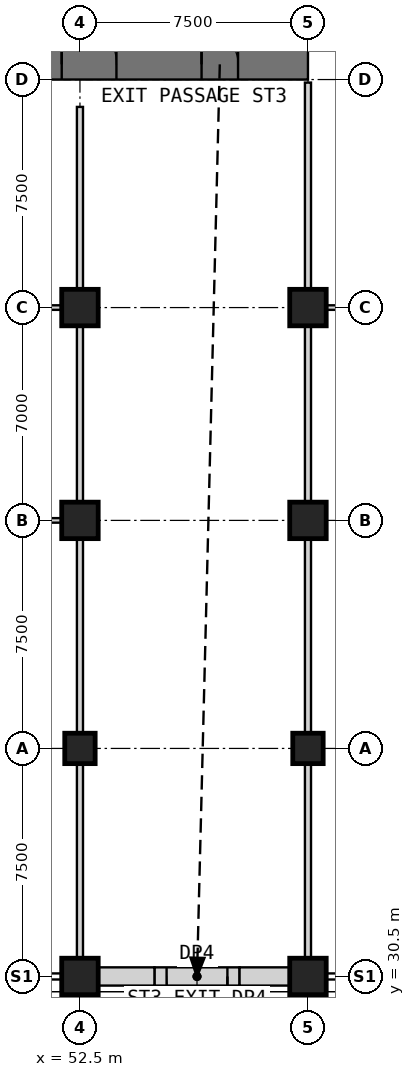
"""IFC4 building model, lengths in metres.
Left out: names, types, materials, properties, quantities, classifications, styles, units other than length and angle.
Written with IfcOpenShell. Run it as: python <this file> out.ifc"""

import sys

from ifc_helpers import new_model, si_unit, direction, frame, frame_2d, origin, origin_2d, place, context, subcontext, project, spatial, rectangle, extrude, element, fill, save


model = new_model("IFC4")
c1 = context("Model", 3, precision=1e-05, world=origin(), true_north=direction((0.0, 1.0)))
c2 = subcontext(c1, "Body", "Model", "MODEL_VIEW")
j1 = project(units=[si_unit("LENGTHUNIT", "METRE"), si_unit("PLANEANGLEUNIT", "RADIAN")], contexts=[c1])
p1 = place(None, origin())
s1 = spatial("IfcSite", under=j1, at=p1, CompositionType="ELEMENT")
p2 = place(p1, origin())
s2 = spatial("IfcBuilding", under=s1, at=p2, CompositionType="ELEMENT")
p3 = place(p2, origin())
s3 = spatial("IfcBuildingStorey", under=s2, at=p3, CompositionType="ELEMENT", Elevation=0.0)
p4 = place(p3, frame((52.5, 38.0, 0.0), z_axis=(0.0, 0.0, 1.0), x_axis=(1.0, 0.0, 0.0)))
e1 = element("IfcColumn", 1, at=p4, inside=s3, PredefinedType="COLUMN", context=c2, shape_type="SweptSolid", body=[
    extrude(rectangle(XDim=1.0, YDim=1.0, at=origin_2d()), origin(), (0.0, 0.0, 1.0), 8.0),
])
for number, where, z_axis, x_axis in (
    (2, (52.5, 45.5, 0.0), (0.0, 0.0, 1.0), (1.0, 0.0, 0.0)),
    (3, (52.5, 52.5, 0.0), (0.0, 0.0, 1.0), (1.0, 0.0, 0.0)),
):
    element("IfcColumn", number, at=place(p3, frame(where, z_axis=z_axis, x_axis=x_axis)), inside=s3, PredefinedType="COLUMN", context=c2, shape_type="SweptSolid", body=[
        extrude(rectangle(XDim=1.2, YDim=1.2, at=origin_2d()), origin(), (0.0, 0.0, 1.0), 8.0),
    ])
p5 = place(p3, frame((60.0, 38.0, 0.0), z_axis=(0.0, 0.0, 1.0), x_axis=(1.0, 0.0, 0.0)))
e4 = element("IfcColumn", 4, at=p5, inside=s3, PredefinedType="COLUMN", context=c2, shape_type="SweptSolid", body=[
    extrude(rectangle(XDim=1.0, YDim=1.0, at=origin_2d()), origin(), (0.0, 0.0, 1.0), 8.0),
])
for number, where, z_axis, x_axis in (
    (5, (60.0, 45.5, 0.0), (0.0, 0.0, 1.0), (1.0, 0.0, 0.0)),
    (6, (60.0, 52.5, 0.0), (0.0, 0.0, 1.0), (1.0, 0.0, 0.0)),
    (7, (52.5, 30.5, 0.0), (0.0, 0.0, 1.0), (1.0, 0.0, 0.0)),
    (8, (60.0, 30.5, 0.0), (0.0, 0.0, 1.0), (1.0, 0.0, 0.0)),
):
    element("IfcColumn", number, at=place(p3, frame(where, z_axis=z_axis, x_axis=x_axis)), inside=s3, PredefinedType="COLUMN", context=c2, shape_type="SweptSolid", body=[
        extrude(rectangle(XDim=1.2, YDim=1.2, at=origin_2d()), origin(), (0.0, 0.0, 1.0), 8.0),
    ])
p6 = place(p3, frame((30.0, 60.5, 0.0), z_axis=(0.0, 0.0, 1.0), x_axis=(1.0, 0.0, 0.0)))
e9 = element("IfcWall", 9, at=p6, inside=s3, PredefinedType="SHEAR", context=c2, shape_type="SweptSolid", body=[
    extrude(rectangle(XDim=30.0, YDim=1.0, at=frame_2d((15.0, 0.0))), origin(), (0.0, 0.0, 1.0), 8.0),
])
p7 = place(p6, frame((21.9, 0.0, 0.0)))
e10 = element("IfcOpeningElement", 10, at=p7, cuts=e9, PredefinedType="OPENING", context=c2, shape_type="SweptSolid", body=[
    extrude(rectangle(XDim=1.8, YDim=2.1, at=frame_2d((0.9, 1.05))), frame((0.0, 0.51, 0.0), z_axis=(0.0, -1.0, 0.0), x_axis=(1.0, 0.0, 0.0)), (0.0, 0.0, 1.0), 1.02),
])
p8 = place(p6, frame((26.5, 0.0, 0.0)))
e11 = element("IfcOpeningElement", 11, at=p8, cuts=e9, PredefinedType="OPENING", context=c2, shape_type="SweptSolid", body=[
    extrude(rectangle(XDim=1.2, YDim=2.1, at=frame_2d((0.6, 1.05))), frame((0.0, 0.51, 0.0), z_axis=(0.0, -1.0, 0.0), x_axis=(1.0, 0.0, 0.0)), (0.0, 0.0, 1.0), 1.02),
])
p9 = place(p3, frame((57.75, 30.5, 0.0), z_axis=(0.0, 0.0, 1.0), x_axis=(-1.0, 0.0, 0.0)))
e12 = element("IfcWall", 12, at=p9, inside=s3, PredefinedType="PARTITIONING", context=c2, shape_type="SweptSolid", body=[
    extrude(rectangle(XDim=2.8, YDim=0.6, at=frame_2d((1.4, 0.0))), origin(), (0.0, 0.0, 1.0), 7.1),
])
p10 = place(p9, frame((0.4, 0.0, 0.0)))
e13 = element("IfcOpeningElement", 13, at=p10, cuts=e12, PredefinedType="OPENING", context=c2, shape_type="SweptSolid", body=[
    extrude(rectangle(XDim=2.0, YDim=2.4, at=frame_2d((1.0, 1.2))), frame((0.0, 0.31, 0.0), z_axis=(0.0, -1.0, 0.0), x_axis=(1.0, 0.0, 0.0)), (0.0, 0.0, 1.0), 0.62),
])
p11 = place(p3, frame((53.1, 30.5, 0.0), z_axis=(0.0, 0.0, 1.0), x_axis=(1.0, 0.0, 0.0)))
e14 = element("IfcWall", 14, at=p11, inside=s3, PredefinedType="PARTITIONING", context=c2, shape_type="SweptSolid", body=[
    extrude(rectangle(XDim=1.85, YDim=0.6, at=frame_2d((0.925, 0.0))), origin(), (0.0, 0.0, 1.0), 7.1),
])
p12 = place(p3, frame((57.75, 30.5, 0.0), z_axis=(0.0, 0.0, 1.0), x_axis=(1.0, 0.0, 0.0)))
e15 = element("IfcWall", 15, at=p12, inside=s3, PredefinedType="PARTITIONING", context=c2, shape_type="SweptSolid", body=[
    extrude(rectangle(XDim=1.65, YDim=0.6, at=frame_2d((0.825, 0.0))), origin(), (0.0, 0.0, 1.0), 7.1),
])
p13 = place(p3, frame((45.6, 45.5, 0.0), z_axis=(0.0, 0.0, 1.0), x_axis=(1.0, 0.0, 0.0)))
e16 = element("IfcWall", 16, at=p13, inside=s3, PredefinedType="PARTITIONING", context=c2, shape_type="SweptSolid", body=[
    extrude(rectangle(XDim=6.3, YDim=0.15, at=frame_2d((3.15, 0.0))), origin(), (0.0, 0.0, 1.0), 7.7),
])
p14 = place(p13, frame((0.5, 0.0, 0.0)))
e17 = element("IfcOpeningElement", 17, at=p14, cuts=e16, PredefinedType="OPENING", context=c2, shape_type="SweptSolid", body=[
    extrude(rectangle(XDim=1.8, YDim=2.4, at=frame_2d((0.9, 1.2))), frame((0.0, 0.085, 0.0), z_axis=(0.0, -1.0, 0.0), x_axis=(1.0, 0.0, 0.0)), (0.0, 0.0, 1.0), 0.17),
])
p15 = place(p3, frame((51.9, 52.5, 0.0), z_axis=(0.0, 0.0, 1.0), x_axis=(-1.0, 0.0, 0.0)))
e18 = element("IfcWall", 18, at=p15, inside=s3, PredefinedType="PARTITIONING", context=c2, shape_type="SweptSolid", body=[
    extrude(rectangle(XDim=6.3, YDim=0.15, at=frame_2d((3.15, 0.0))), origin(), (0.0, 0.0, 1.0), 7.7),
])
p16 = place(p15, frame((2.25, 0.0, 0.0)))
e19 = element("IfcOpeningElement", 19, at=p16, cuts=e18, PredefinedType="OPENING", context=c2, shape_type="SweptSolid", body=[
    extrude(rectangle(XDim=1.8, YDim=2.4, at=frame_2d((0.9, 1.2))), frame((0.0, 0.085, 0.0), z_axis=(0.0, -1.0, 0.0), x_axis=(1.0, 0.0, 0.0)), (0.0, 0.0, 1.0), 0.17),
])
p17 = place(p3, frame((66.9, 52.5, 0.0), z_axis=(0.0, 0.0, 1.0), x_axis=(-1.0, 0.0, 0.0)))
e20 = element("IfcWall", 20, at=p17, inside=s3, PredefinedType="PARTITIONING", context=c2, shape_type="SweptSolid", body=[
    extrude(rectangle(XDim=6.3, YDim=0.15, at=frame_2d((3.15, 0.0))), origin(), (0.0, 0.0, 1.0), 7.7),
])
p18 = place(p17, frame((2.25, 0.0, 0.0)))
e21 = element("IfcOpeningElement", 21, at=p18, cuts=e20, PredefinedType="OPENING", context=c2, shape_type="SweptSolid", body=[
    extrude(rectangle(XDim=1.8, YDim=2.4, at=frame_2d((0.9, 1.2))), frame((0.0, 0.085, 0.0), z_axis=(0.0, -1.0, 0.0), x_axis=(1.0, 0.0, 0.0)), (0.0, 0.0, 1.0), 0.17),
])
for number, where, z_axis, x_axis in (
    (22, (52.5, 31.1, 0.0), (0.0, 0.0, 1.0), (0.0, 1.0, 0.0)),
    (23, (52.5, 38.5, 0.0), (0.0, 0.0, 1.0), (0.0, 1.0, 0.0)),
):
    element("IfcWall", number, at=place(p3, frame(where, z_axis=z_axis, x_axis=x_axis)), inside=s3, PredefinedType="PARTITIONING", context=c2, shape_type="SweptSolid", body=[
        extrude(rectangle(XDim=6.4, YDim=0.2, at=frame_2d((3.2, 0.0))), origin(), (0.0, 0.0, 1.0), 7.7),
    ])
p19 = place(p3, frame((52.5, 46.1, 0.0), z_axis=(0.0, 0.0, 1.0), x_axis=(0.0, 1.0, 0.0)))
e24 = element("IfcWall", 24, at=p19, inside=s3, PredefinedType="PARTITIONING", context=c2, shape_type="SweptSolid", body=[
    extrude(rectangle(XDim=5.8, YDim=0.2, at=frame_2d((2.9, 0.0))), origin(), (0.0, 0.0, 1.0), 7.7),
])
p20 = place(p3, frame((52.5, 53.1, 0.0), z_axis=(0.0, 0.0, 1.0), x_axis=(0.0, 1.0, 0.0)))
e25 = element("IfcWall", 25, at=p20, inside=s3, PredefinedType="PARTITIONING", context=c2, shape_type="SweptSolid", body=[
    extrude(rectangle(XDim=6.0, YDim=0.2, at=frame_2d((3.0, 0.0))), origin(), (0.0, 0.0, 1.0), 7.7),
])
for number, where, z_axis, x_axis in (
    (26, (60.0, 31.1, 0.0), (0.0, 0.0, 1.0), (0.0, 1.0, 0.0)),
    (27, (60.0, 38.5, 0.0), (0.0, 0.0, 1.0), (0.0, 1.0, 0.0)),
):
    element("IfcWall", number, at=place(p3, frame(where, z_axis=z_axis, x_axis=x_axis)), inside=s3, PredefinedType="PARTITIONING", context=c2, shape_type="SweptSolid", body=[
        extrude(rectangle(XDim=6.4, YDim=0.2, at=frame_2d((3.2, 0.0))), origin(), (0.0, 0.0, 1.0), 7.7),
    ])
p21 = place(p3, frame((60.0, 46.1, 0.0), z_axis=(0.0, 0.0, 1.0), x_axis=(0.0, 1.0, 0.0)))
e28 = element("IfcWall", 28, at=p21, inside=s3, PredefinedType="PARTITIONING", context=c2, shape_type="SweptSolid", body=[
    extrude(rectangle(XDim=5.8, YDim=0.2, at=frame_2d((2.9, 0.0))), origin(), (0.0, 0.0, 1.0), 7.7),
])
p22 = place(p3, frame((60.0, 53.1, 0.0), z_axis=(0.0, 0.0, 1.0), x_axis=(0.0, 1.0, 0.0)))
e29 = element("IfcWall", 29, at=p22, inside=s3, PredefinedType="PARTITIONING", context=c2, shape_type="SweptSolid", body=[
    extrude(rectangle(XDim=6.8, YDim=0.2, at=frame_2d((3.4, 0.0))), origin(), (0.0, 0.0, 1.0), 7.7),
])
p23 = place(p7, origin())
e30 = element("IfcDoor", 30, at=p23, inside=s3, OperationType="DOUBLE_DOOR_SINGLE_SWING", PredefinedType="DOOR", context=c2, shape_type="SweptSolid", body=[
    extrude(rectangle(XDim=1.8, YDim=2.1, at=frame_2d((0.9, 1.05))), frame((0.0, 0.025, 0.0), z_axis=(0.0, -1.0, 0.0), x_axis=(1.0, 0.0, 0.0)), (0.0, 0.0, 1.0), 0.05),
])
fill(e10, e30)
p24 = place(p8, origin())
e31 = element("IfcDoor", 31, at=p24, inside=s3, OperationType="SINGLE_SWING_LEFT", PredefinedType="DOOR", context=c2, shape_type="SweptSolid", body=[
    extrude(rectangle(XDim=1.2, YDim=2.1, at=frame_2d((0.6, 1.05))), frame((0.0, 0.025, 0.0), z_axis=(0.0, -1.0, 0.0), x_axis=(1.0, 0.0, 0.0)), (0.0, 0.0, 1.0), 0.05),
])
fill(e11, e31)
p25 = place(p10, origin())
e32 = element("IfcDoor", 32, at=p25, inside=s3, OperationType="SINGLE_SWING_LEFT", PredefinedType="DOOR", context=c2, shape_type="SweptSolid", body=[
    extrude(rectangle(XDim=2.0, YDim=2.4, at=frame_2d((1.0, 1.2))), frame((0.0, 0.025, 0.0), z_axis=(0.0, -1.0, 0.0), x_axis=(1.0, 0.0, 0.0)), (0.0, 0.0, 1.0), 0.05),
])
fill(e13, e32)
save(model, sys.argv[1])
